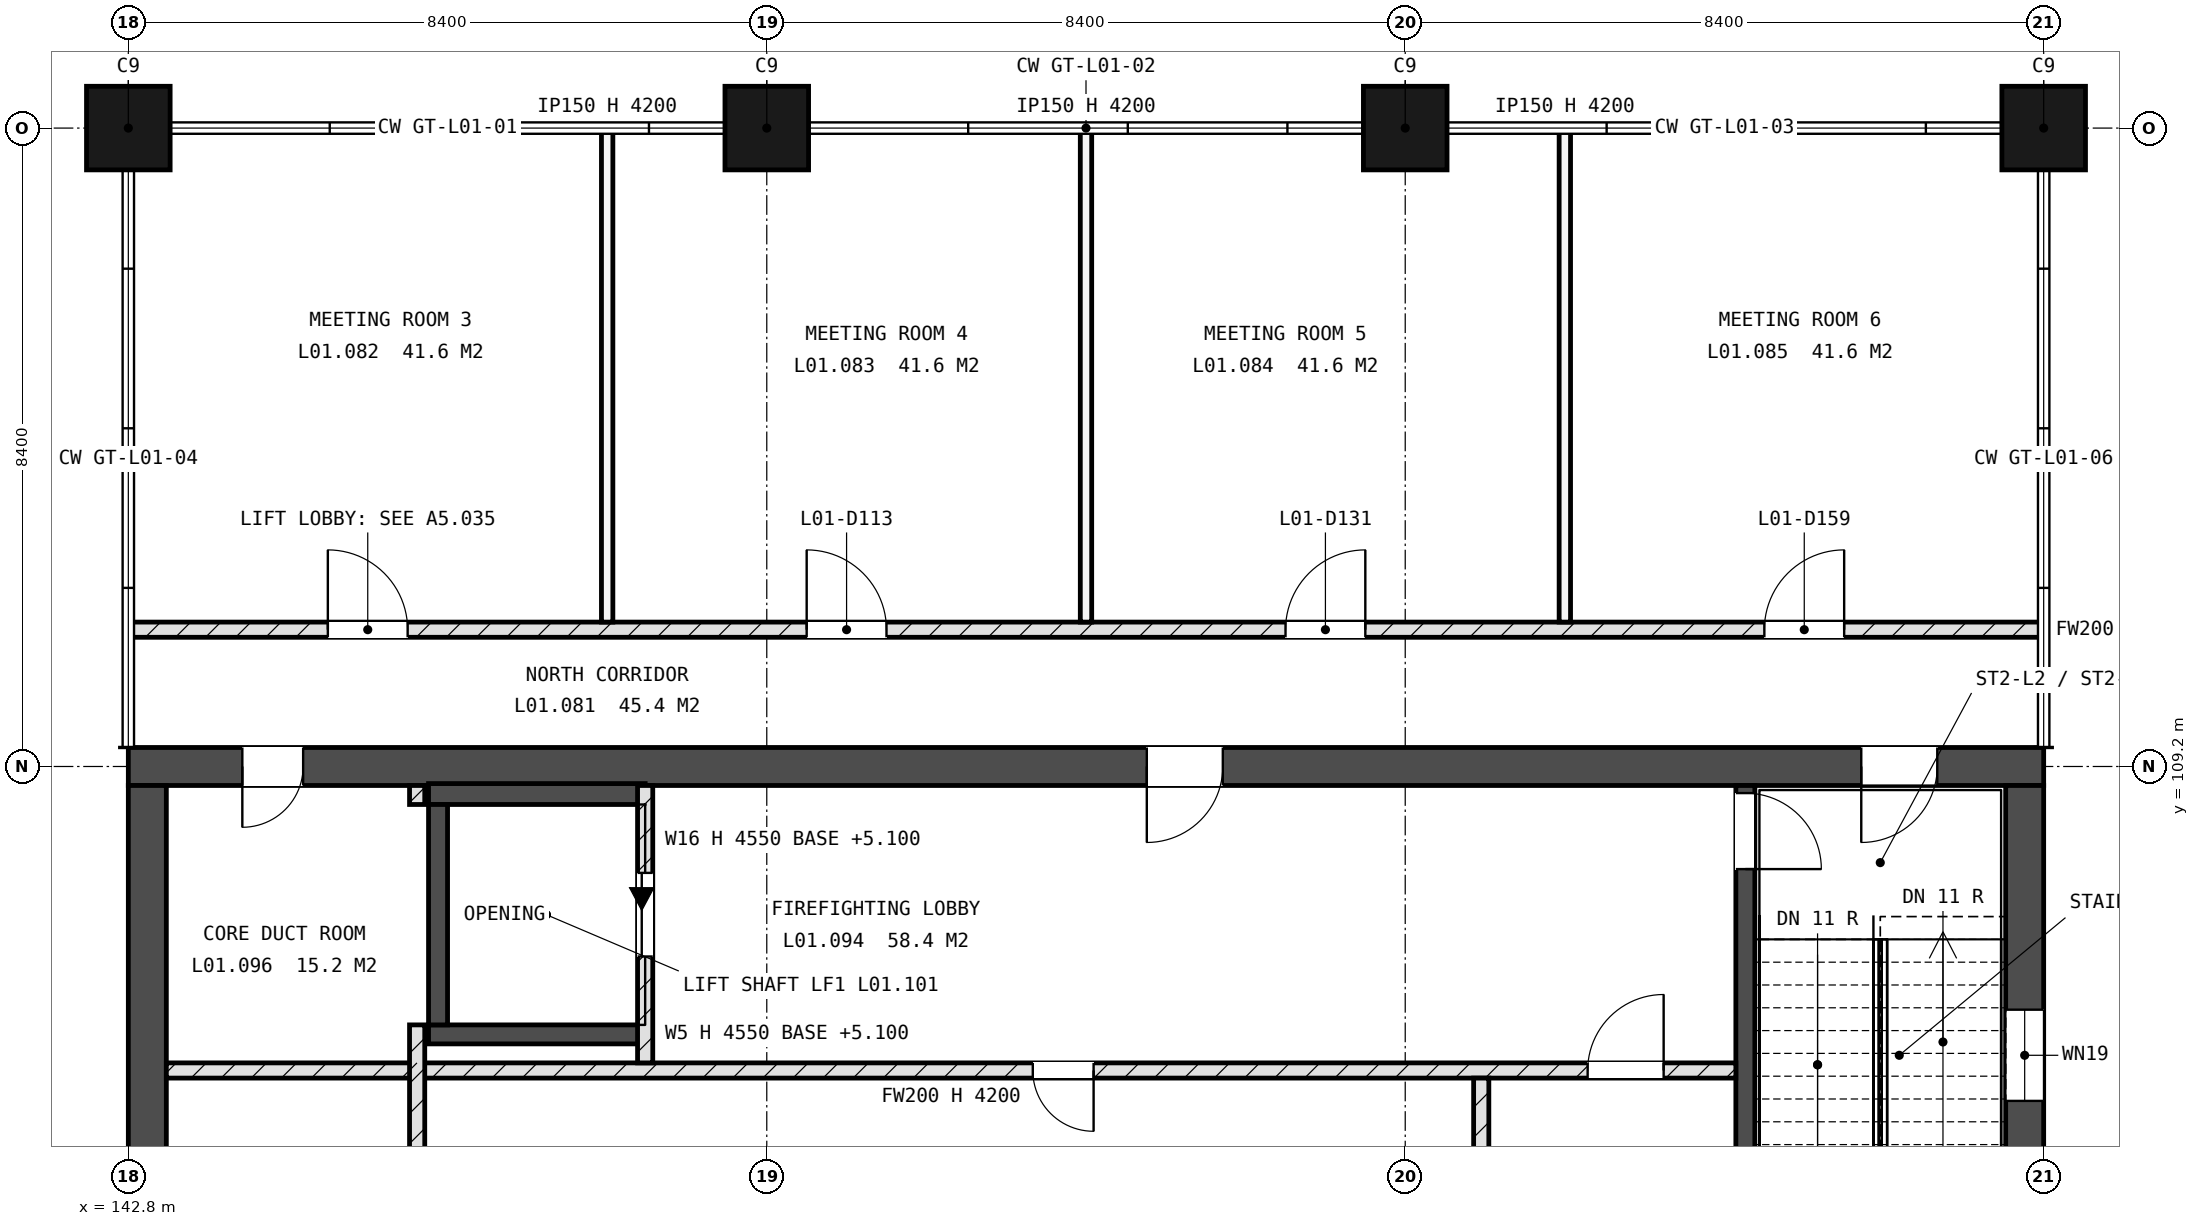
"""IFC4 building model, lengths in metres.
Left out: names, types, materials, properties, quantities, classifications, styles, units other than length and angle.
Written with IfcOpenShell. Run it as: python <this file> out.ifc"""

import sys

from ifc_helpers import new_model, si_unit, direction, frame, frame_2d, origin, origin_2d, place, context, subcontext, project, spatial, rectangle, extrude, element, fill, save


model = new_model("IFC4")
c1 = context("Model", 3, precision=1e-05, world=origin(), true_north=direction((0.0, 1.0)))
c2 = subcontext(c1, "Body", "Model", "MODEL_VIEW")
j1 = project(units=[si_unit("LENGTHUNIT", "METRE"), si_unit("PLANEANGLEUNIT", "RADIAN")], contexts=[c1])
p1 = place(None, origin())
s1 = spatial("IfcSite", under=j1, at=p1, CompositionType="ELEMENT")
p2 = place(p1, origin())
s2 = spatial("IfcBuilding", under=s1, at=p2, CompositionType="ELEMENT")
p3 = place(p2, frame((0.0, 0.0, 5.4)))
s3 = spatial("IfcBuildingStorey", under=s2, at=p3, CompositionType="ELEMENT", Elevation=5.4)
for number, where, z_axis, x_axis in (
    (1, (142.8, 117.6, -0.3), (0.0, 0.0, 1.0), (1.0, 0.0, 0.0)),
    (2, (151.2, 117.6, -0.3), (0.0, 0.0, 1.0), (1.0, 0.0, 0.0)),
    (3, (159.6, 117.6, -0.3), (0.0, 0.0, 1.0), (1.0, 0.0, 0.0)),
    (4, (168.0, 117.6, -0.3), (0.0, 0.0, 1.0), (1.0, 0.0, 0.0)),
):
    element("IfcColumn", number, at=place(p3, frame(where, z_axis=z_axis, x_axis=x_axis)), inside=s3, PredefinedType="COLUMN", context=c2, shape_type="SweptSolid", body=[
        extrude(rectangle(XDim=1.1, YDim=1.1, at=origin_2d()), origin(), (0.0, 0.0, 1.0), 4.55),
    ])
p4 = place(p3, frame((142.8, 109.2, -0.3), z_axis=(0.0, 0.0, 1.0), x_axis=(1.0, 0.0, 0.0)))
e5 = element("IfcWall", 5, at=p4, inside=s3, PredefinedType="SHEAR", context=c2, shape_type="SweptSolid", body=[
    extrude(rectangle(XDim=25.2, YDim=0.5, at=frame_2d((12.6, 0.0))), origin(), (0.0, 0.0, 1.0), 4.55),
])
p5 = place(p4, frame((22.8, 0.0, 0.3)))
e6 = element("IfcOpeningElement", 6, at=p5, cuts=e5, PredefinedType="OPENING", context=c2, shape_type="SweptSolid", body=[
    extrude(rectangle(XDim=1.0, YDim=2.1, at=frame_2d((0.5, 1.05))), frame((0.0, 0.26, 0.0), z_axis=(0.0, -1.0, 0.0), x_axis=(1.0, 0.0, 0.0)), (0.0, 0.0, 1.0), 0.52),
])
p6 = place(p4, frame((1.5, 0.0, 0.3)))
e7 = element("IfcOpeningElement", 7, at=p6, cuts=e5, PredefinedType="OPENING", context=c2, shape_type="SweptSolid", body=[
    extrude(rectangle(XDim=0.8, YDim=2.1, at=frame_2d((0.4, 1.05))), frame((0.0, 0.26, 0.0), z_axis=(0.0, -1.0, 0.0), x_axis=(1.0, 0.0, 0.0)), (0.0, 0.0, 1.0), 0.52),
])
p7 = place(p4, frame((13.4, 0.0, 0.3)))
e8 = element("IfcOpeningElement", 8, at=p7, cuts=e5, PredefinedType="OPENING", context=c2, shape_type="SweptSolid", body=[
    extrude(rectangle(XDim=1.0, YDim=2.1, at=frame_2d((0.5, 1.05))), frame((0.0, 0.26, 0.0), z_axis=(0.0, -1.0, 0.0), x_axis=(1.0, 0.0, 0.0)), (0.0, 0.0, 1.0), 0.52),
])
p8 = place(p3, frame((143.05, 92.65, -0.3), z_axis=(0.0, 0.0, 1.0), x_axis=(0.0, 1.0, 0.0)))
e9 = element("IfcWall", 9, at=p8, inside=s3, PredefinedType="SHEAR", context=c2, shape_type="SweptSolid", body=[
    extrude(rectangle(XDim=16.3, YDim=0.5, at=frame_2d((8.15, 0.0))), origin(), (0.0, 0.0, 1.0), 4.55),
])
p9 = place(p8, frame((2.95, 0.0, 1.9)))
e10 = element("IfcOpeningElement", 10, at=p9, cuts=e9, PredefinedType="OPENING", context=c2, shape_type="SweptSolid", body=[
    extrude(rectangle(XDim=1.2, YDim=0.9, at=frame_2d((0.6, 0.45))), frame((0.0, 0.26, 0.0), z_axis=(0.0, -1.0, 0.0), x_axis=(1.0, 0.0, 0.0)), (0.0, 0.0, 1.0), 0.52),
])
p10 = place(p3, frame((167.75, 92.65, -0.3), z_axis=(0.0, 0.0, 1.0), x_axis=(0.0, 1.0, 0.0)))
e11 = element("IfcWall", 11, at=p10, inside=s3, PredefinedType="SHEAR", context=c2, shape_type="SweptSolid", body=[
    extrude(rectangle(XDim=16.3, YDim=0.5, at=frame_2d((8.15, 0.0))), origin(), (0.0, 0.0, 1.0), 4.55),
])
p11 = place(p10, frame((12.15, 0.0, 1.9)))
e12 = element("IfcOpeningElement", 12, at=p11, cuts=e11, PredefinedType="OPENING", context=c2, shape_type="SweptSolid", body=[
    extrude(rectangle(XDim=1.2, YDim=0.9, at=frame_2d((0.6, 0.45))), frame((0.0, 0.26, 0.0), z_axis=(0.0, -1.0, 0.0), x_axis=(1.0, 0.0, 0.0)), (0.0, 0.0, 1.0), 0.52),
])
p12 = place(p3, frame((164.075, 101.35, -0.3), z_axis=(0.0, 0.0, 1.0), x_axis=(0.0, 1.0, 0.0)))
e13 = element("IfcWall", 13, at=p12, inside=s3, PredefinedType="SHEAR", context=c2, shape_type="SweptSolid", body=[
    extrude(rectangle(XDim=7.6, YDim=0.25, at=frame_2d((3.8, 0.0))), origin(), (0.0, 0.0, 1.0), 4.55),
])
p13 = place(p12, frame((6.5, 0.0, 0.3)))
e14 = element("IfcOpeningElement", 14, at=p13, cuts=e13, PredefinedType="OPENING", context=c2, shape_type="SweptSolid", body=[
    extrude(rectangle(XDim=1.0, YDim=2.1, at=frame_2d((0.5, 1.05))), frame((0.0, 0.135, 0.0), z_axis=(0.0, -1.0, 0.0), x_axis=(1.0, 0.0, 0.0)), (0.0, 0.0, 1.0), 0.27),
])
p14 = place(p3, frame((146.75, 105.675, -0.3), z_axis=(0.0, 0.0, 1.0), x_axis=(1.0, 0.0, 0.0)))
e15 = element("IfcWall", 15, at=p14, inside=s3, PredefinedType="SHEAR", context=c2, shape_type="SweptSolid", body=[
    extrude(rectangle(XDim=2.85, YDim=0.25, at=frame_2d((1.425, 0.0))), origin(), (0.0, 0.0, 1.0), 4.55),
])
p15 = place(p3, frame((146.75, 108.837, -0.3), z_axis=(0.0, 0.0, 1.0), x_axis=(1.0, 0.0, 0.0)))
e16 = element("IfcWall", 16, at=p15, inside=s3, PredefinedType="SHEAR", context=c2, shape_type="SweptSolid", body=[
    extrude(rectangle(XDim=2.85, YDim=0.275, at=frame_2d((1.425, 0.0))), origin(), (0.0, 0.0, 1.0), 4.55),
])
p16 = place(p3, frame((146.875, 105.8, -0.3), z_axis=(0.0, 0.0, 1.0), x_axis=(0.0, 1.0, 0.0)))
e17 = element("IfcWall", 17, at=p16, inside=s3, PredefinedType="SHEAR", context=c2, shape_type="SweptSolid", body=[
    extrude(rectangle(XDim=2.9, YDim=0.25, at=frame_2d((1.45, 0.0))), origin(), (0.0, 0.0, 1.0), 4.55),
])
p17 = place(p3, frame((143.3, 105.2, 0.0), z_axis=(0.0, 0.0, 1.0), x_axis=(1.0, 0.0, 0.0)))
e18 = element("IfcWall", 18, at=p17, inside=s3, PredefinedType="SOLIDWALL", context=c2, shape_type="SweptSolid", body=[
    extrude(rectangle(XDim=20.65, YDim=0.2, at=frame_2d((10.325, 0.0))), origin(), (0.0, 0.0, 1.0), 4.2),
])
p18 = place(p17, frame((11.4, 0.0, 0.0)))
e19 = element("IfcOpeningElement", 19, at=p18, cuts=e18, PredefinedType="OPENING", context=c2, shape_type="SweptSolid", body=[
    extrude(rectangle(XDim=0.8, YDim=2.1, at=frame_2d((0.4, 1.05))), frame((0.0, 0.11, 0.0), z_axis=(0.0, -1.0, 0.0), x_axis=(1.0, 0.0, 0.0)), (0.0, 0.0, 1.0), 0.22),
])
p19 = place(p17, frame((18.7, 0.0, 0.0)))
e20 = element("IfcOpeningElement", 20, at=p19, cuts=e18, PredefinedType="OPENING", context=c2, shape_type="SweptSolid", body=[
    extrude(rectangle(XDim=1.0, YDim=2.1, at=frame_2d((0.5, 1.05))), frame((0.0, 0.11, 0.0), z_axis=(0.0, -1.0, 0.0), x_axis=(1.0, 0.0, 0.0)), (0.0, 0.0, 1.0), 0.22),
])
p20 = place(p3, frame((142.8, 111.0, 0.0), z_axis=(0.0, 0.0, 1.0), x_axis=(1.0, 0.0, 0.0)))
e21 = element("IfcWall", 21, at=p20, inside=s3, PredefinedType="SOLIDWALL", context=c2, shape_type="SweptSolid", body=[
    extrude(rectangle(XDim=25.2, YDim=0.2, at=frame_2d((12.6, 0.0))), origin(), (0.0, 0.0, 1.0), 4.2),
])
p21 = place(p20, frame((2.625, 0.0, 0.0)))
e22 = element("IfcOpeningElement", 22, at=p21, cuts=e21, PredefinedType="OPENING", context=c2, shape_type="SweptSolid", body=[
    extrude(rectangle(XDim=1.05, YDim=2.1, at=frame_2d((0.525, 1.05))), frame((0.0, 0.11, 0.0), z_axis=(0.0, -1.0, 0.0), x_axis=(1.0, 0.0, 0.0)), (0.0, 0.0, 1.0), 0.22),
])
p22 = place(p20, frame((8.925, 0.0, 0.0)))
e23 = element("IfcOpeningElement", 23, at=p22, cuts=e21, PredefinedType="OPENING", context=c2, shape_type="SweptSolid", body=[
    extrude(rectangle(XDim=1.05, YDim=2.1, at=frame_2d((0.525, 1.05))), frame((0.0, 0.11, 0.0), z_axis=(0.0, -1.0, 0.0), x_axis=(1.0, 0.0, 0.0)), (0.0, 0.0, 1.0), 0.22),
])
p23 = place(p20, frame((15.225, 0.0, 0.0)))
e24 = element("IfcOpeningElement", 24, at=p23, cuts=e21, PredefinedType="OPENING", context=c2, shape_type="SweptSolid", body=[
    extrude(rectangle(XDim=1.05, YDim=2.1, at=frame_2d((0.525, 1.05))), frame((0.0, 0.11, 0.0), z_axis=(0.0, -1.0, 0.0), x_axis=(1.0, 0.0, 0.0)), (0.0, 0.0, 1.0), 0.22),
])
p24 = place(p20, frame((21.525, 0.0, 0.0)))
e25 = element("IfcOpeningElement", 25, at=p24, cuts=e21, PredefinedType="OPENING", context=c2, shape_type="SweptSolid", body=[
    extrude(rectangle(XDim=1.05, YDim=2.1, at=frame_2d((0.525, 1.05))), frame((0.0, 0.11, 0.0), z_axis=(0.0, -1.0, 0.0), x_axis=(1.0, 0.0, 0.0)), (0.0, 0.0, 1.0), 0.22),
])
p25 = place(p3, frame((146.6, 100.5, 0.0), z_axis=(0.0, 0.0, 1.0), x_axis=(0.0, 1.0, 0.0)))
e26 = element("IfcWall", 26, at=p25, inside=s3, PredefinedType="SOLIDWALL", context=c2, shape_type="SweptSolid", body=[
    extrude(rectangle(XDim=5.3, YDim=0.2, at=frame_2d((2.65, 0.0))), origin(), (0.0, 0.0, 1.0), 4.2),
])
p26 = place(p25, frame((1.8, 0.0, 0.0)))
e27 = element("IfcOpeningElement", 27, at=p26, cuts=e26, PredefinedType="OPENING", context=c2, shape_type="SweptSolid", body=[
    extrude(rectangle(XDim=1.0, YDim=2.1, at=frame_2d((0.5, 1.05))), frame((0.0, 0.11, 0.0), z_axis=(0.0, -1.0, 0.0), x_axis=(1.0, 0.0, 0.0)), (0.0, 0.0, 1.0), 0.22),
])
p27 = place(p3, frame((146.6, 108.7, 0.0), z_axis=(0.0, 0.0, 1.0), x_axis=(0.0, 1.0, 0.0)))
e28 = element("IfcWall", 28, at=p27, inside=s3, PredefinedType="SOLIDWALL", context=c2, shape_type="SweptSolid", body=[
    extrude(rectangle(XDim=0.25, YDim=0.2, at=frame_2d((0.125, 0.0))), origin(), (0.0, 0.0, 1.0), 4.2),
])
p28 = place(p3, frame((149.1, 111.1, 0.0), z_axis=(0.0, 0.0, 1.0), x_axis=(0.0, 1.0, 0.0)))
e29 = element("IfcWall", 29, at=p28, inside=s3, PredefinedType="PARTITIONING", context=c2, shape_type="SweptSolid", body=[
    extrude(rectangle(XDim=6.5, YDim=0.15, at=frame_2d((3.25, 0.0))), origin(), (0.0, 0.0, 1.0), 4.2),
])
p29 = place(p3, frame((149.6, 105.3, 0.0), z_axis=(0.0, 0.0, 1.0), x_axis=(0.0, 1.0, 0.0)))
e30 = element("IfcWall", 30, at=p29, inside=s3, PredefinedType="SOLIDWALL", context=c2, shape_type="SweptSolid", body=[
    extrude(rectangle(XDim=3.65, YDim=0.2, at=frame_2d((1.825, 0.0))), origin(), (0.0, 0.0, 1.0), 4.2),
])
p30 = place(p29, frame((1.4, 0.0, 0.0)))
e31 = element("IfcOpeningElement", 31, at=p30, cuts=e30, PredefinedType="OPENING", context=c2, shape_type="SweptSolid", body=[
    extrude(rectangle(XDim=1.1, YDim=2.1, at=frame_2d((0.55, 1.05))), frame((0.0, 0.11, 0.0), z_axis=(0.0, -1.0, 0.0), x_axis=(1.0, 0.0, 0.0)), (0.0, 0.0, 1.0), 0.22),
])
p31 = place(p3, frame((155.4, 111.1, 0.0), z_axis=(0.0, 0.0, 1.0), x_axis=(0.0, 1.0, 0.0)))
e32 = element("IfcWall", 32, at=p31, inside=s3, PredefinedType="PARTITIONING", context=c2, shape_type="SweptSolid", body=[
    extrude(rectangle(XDim=6.5, YDim=0.15, at=frame_2d((3.25, 0.0))), origin(), (0.0, 0.0, 1.0), 4.2),
])
p32 = place(p3, frame((160.6, 92.65, 0.0), z_axis=(0.0, 0.0, 1.0), x_axis=(0.0, 1.0, 0.0)))
e33 = element("IfcWall", 33, at=p32, inside=s3, PredefinedType="SOLIDWALL", context=c2, shape_type="SweptSolid", body=[
    extrude(rectangle(XDim=12.45, YDim=0.2, at=frame_2d((6.225, 0.0))), origin(), (0.0, 0.0, 1.0), 4.2),
])
p33 = place(p32, frame((5.05, 0.0, 0.0)))
e34 = element("IfcOpeningElement", 34, at=p33, cuts=e33, PredefinedType="OPENING", context=c2, shape_type="SweptSolid", body=[
    extrude(rectangle(XDim=0.8, YDim=2.1, at=frame_2d((0.4, 1.05))), frame((0.0, 0.11, 0.0), z_axis=(0.0, -1.0, 0.0), x_axis=(1.0, 0.0, 0.0)), (0.0, 0.0, 1.0), 0.22),
])
p34 = place(p32, frame((0.75, 0.0, 0.0)))
e35 = element("IfcOpeningElement", 35, at=p34, cuts=e33, PredefinedType="OPENING", context=c2, shape_type="SweptSolid", body=[
    extrude(rectangle(XDim=1.0, YDim=2.1, at=frame_2d((0.5, 1.05))), frame((0.0, 0.11, 0.0), z_axis=(0.0, -1.0, 0.0), x_axis=(1.0, 0.0, 0.0)), (0.0, 0.0, 1.0), 0.22),
])
p35 = place(p3, frame((161.7, 111.1, 0.0), z_axis=(0.0, 0.0, 1.0), x_axis=(0.0, 1.0, 0.0)))
e36 = element("IfcWall", 36, at=p35, inside=s3, PredefinedType="PARTITIONING", context=c2, shape_type="SweptSolid", body=[
    extrude(rectangle(XDim=6.5, YDim=0.15, at=frame_2d((3.25, 0.0))), origin(), (0.0, 0.0, 1.0), 4.2),
])
p36 = place(p11, origin())
e37 = element("IfcWindow", 37, at=p36, inside=s3, PartitioningType="SINGLE_PANEL", PredefinedType="WINDOW", context=c2, shape_type="SweptSolid", body=[
    extrude(rectangle(XDim=1.2, YDim=0.9, at=frame_2d((0.6, 0.45))), frame((0.0, 0.03, 0.0), z_axis=(0.0, -1.0, 0.0), x_axis=(1.0, 0.0, 0.0)), (0.0, 0.0, 1.0), 0.06),
])
fill(e12, e37)
p37 = place(p30, origin())
e38 = element("IfcDoor", 38, at=p37, inside=s3, OperationType="SLIDING_TO_LEFT", PredefinedType="DOOR", context=c2, shape_type="SweptSolid", body=[
    extrude(rectangle(XDim=1.1, YDim=2.1, at=frame_2d((0.55, 1.05))), frame((0.0, 0.025, 0.0), z_axis=(0.0, -1.0, 0.0), x_axis=(1.0, 0.0, 0.0)), (0.0, 0.0, 1.0), 0.05),
])
fill(e31, e38)
p38 = place(p13, origin())
e39 = element("IfcDoor", 39, at=p38, inside=s3, OperationType="SINGLE_SWING_LEFT", PredefinedType="DOOR", context=c2, shape_type="SweptSolid", body=[
    extrude(rectangle(XDim=1.0, YDim=2.1, at=frame_2d((0.5, 1.05))), frame((0.0, 0.025, 0.0), z_axis=(0.0, -1.0, 0.0), x_axis=(1.0, 0.0, 0.0)), (0.0, 0.0, 1.0), 0.05),
])
fill(e14, e39)
p39 = place(p5, origin())
e40 = element("IfcDoor", 40, at=p39, inside=s3, OperationType="SINGLE_SWING_LEFT", PredefinedType="DOOR", context=c2, shape_type="SweptSolid", body=[
    extrude(rectangle(XDim=1.0, YDim=2.1, at=frame_2d((0.5, 1.05))), frame((0.0, 0.025, 0.0), z_axis=(0.0, -1.0, 0.0), x_axis=(1.0, 0.0, 0.0)), (0.0, 0.0, 1.0), 0.05),
])
fill(e6, e40)
p40 = place(p21, origin())
e41 = element("IfcDoor", 41, at=p40, inside=s3, OperationType="SINGLE_SWING_RIGHT", PredefinedType="DOOR", context=c2, shape_type="SweptSolid", body=[
    extrude(rectangle(XDim=1.05, YDim=2.1, at=frame_2d((0.525, 1.05))), frame((0.0, 0.025, 0.0), z_axis=(0.0, -1.0, 0.0), x_axis=(1.0, 0.0, 0.0)), (0.0, 0.0, 1.0), 0.05),
])
fill(e22, e41)
p41 = place(p22, origin())
e42 = element("IfcDoor", 42, at=p41, inside=s3, OperationType="SINGLE_SWING_RIGHT", PredefinedType="DOOR", context=c2, shape_type="SweptSolid", body=[
    extrude(rectangle(XDim=1.05, YDim=2.1, at=frame_2d((0.525, 1.05))), frame((0.0, 0.025, 0.0), z_axis=(0.0, -1.0, 0.0), x_axis=(1.0, 0.0, 0.0)), (0.0, 0.0, 1.0), 0.05),
])
fill(e23, e42)
p42 = place(p23, origin())
e43 = element("IfcDoor", 43, at=p42, inside=s3, OperationType="SINGLE_SWING_LEFT", PredefinedType="DOOR", context=c2, shape_type="SweptSolid", body=[
    extrude(rectangle(XDim=1.05, YDim=2.1, at=frame_2d((0.525, 1.05))), frame((0.0, 0.025, 0.0), z_axis=(0.0, -1.0, 0.0), x_axis=(1.0, 0.0, 0.0)), (0.0, 0.0, 1.0), 0.05),
])
fill(e24, e43)
p43 = place(p24, origin())
e44 = element("IfcDoor", 44, at=p43, inside=s3, OperationType="SINGLE_SWING_LEFT", PredefinedType="DOOR", context=c2, shape_type="SweptSolid", body=[
    extrude(rectangle(XDim=1.05, YDim=2.1, at=frame_2d((0.525, 1.05))), frame((0.0, 0.025, 0.0), z_axis=(0.0, -1.0, 0.0), x_axis=(1.0, 0.0, 0.0)), (0.0, 0.0, 1.0), 0.05),
])
fill(e25, e44)
p44 = place(p18, origin())
e45 = element("IfcDoor", 45, at=p44, inside=s3, OperationType="SINGLE_SWING_RIGHT", PredefinedType="DOOR", context=c2, shape_type="SweptSolid", body=[
    extrude(rectangle(XDim=0.8, YDim=2.1, at=frame_2d((0.4, 1.05))), frame((0.0, 0.025, 0.0), z_axis=(0.0, -1.0, 0.0), x_axis=(1.0, 0.0, 0.0)), (0.0, 0.0, 1.0), 0.05),
])
fill(e19, e45)
p45 = place(p6, origin())
e46 = element("IfcDoor", 46, at=p45, inside=s3, OperationType="SINGLE_SWING_LEFT", PredefinedType="DOOR", context=c2, shape_type="SweptSolid", body=[
    extrude(rectangle(XDim=0.8, YDim=2.1, at=frame_2d((0.4, 1.05))), frame((0.0, 0.025, 0.0), z_axis=(0.0, -1.0, 0.0), x_axis=(1.0, 0.0, 0.0)), (0.0, 0.0, 1.0), 0.05),
])
fill(e7, e46)
p46 = place(p7, origin())
e47 = element("IfcDoor", 47, at=p46, inside=s3, OperationType="SINGLE_SWING_LEFT", PredefinedType="DOOR", context=c2, shape_type="SweptSolid", body=[
    extrude(rectangle(XDim=1.0, YDim=2.1, at=frame_2d((0.5, 1.05))), frame((0.0, 0.025, 0.0), z_axis=(0.0, -1.0, 0.0), x_axis=(1.0, 0.0, 0.0)), (0.0, 0.0, 1.0), 0.05),
])
fill(e8, e47)
p47 = place(p19, origin())
e48 = element("IfcDoor", 48, at=p47, inside=s3, OperationType="SINGLE_SWING_LEFT", PredefinedType="DOOR", context=c2, shape_type="SweptSolid", body=[
    extrude(rectangle(XDim=1.0, YDim=2.1, at=frame_2d((0.5, 1.05))), frame((0.0, 0.025, 0.0), z_axis=(0.0, -1.0, 0.0), x_axis=(1.0, 0.0, 0.0)), (0.0, 0.0, 1.0), 0.05),
])
fill(e20, e48)
save(model, sys.argv[1])
